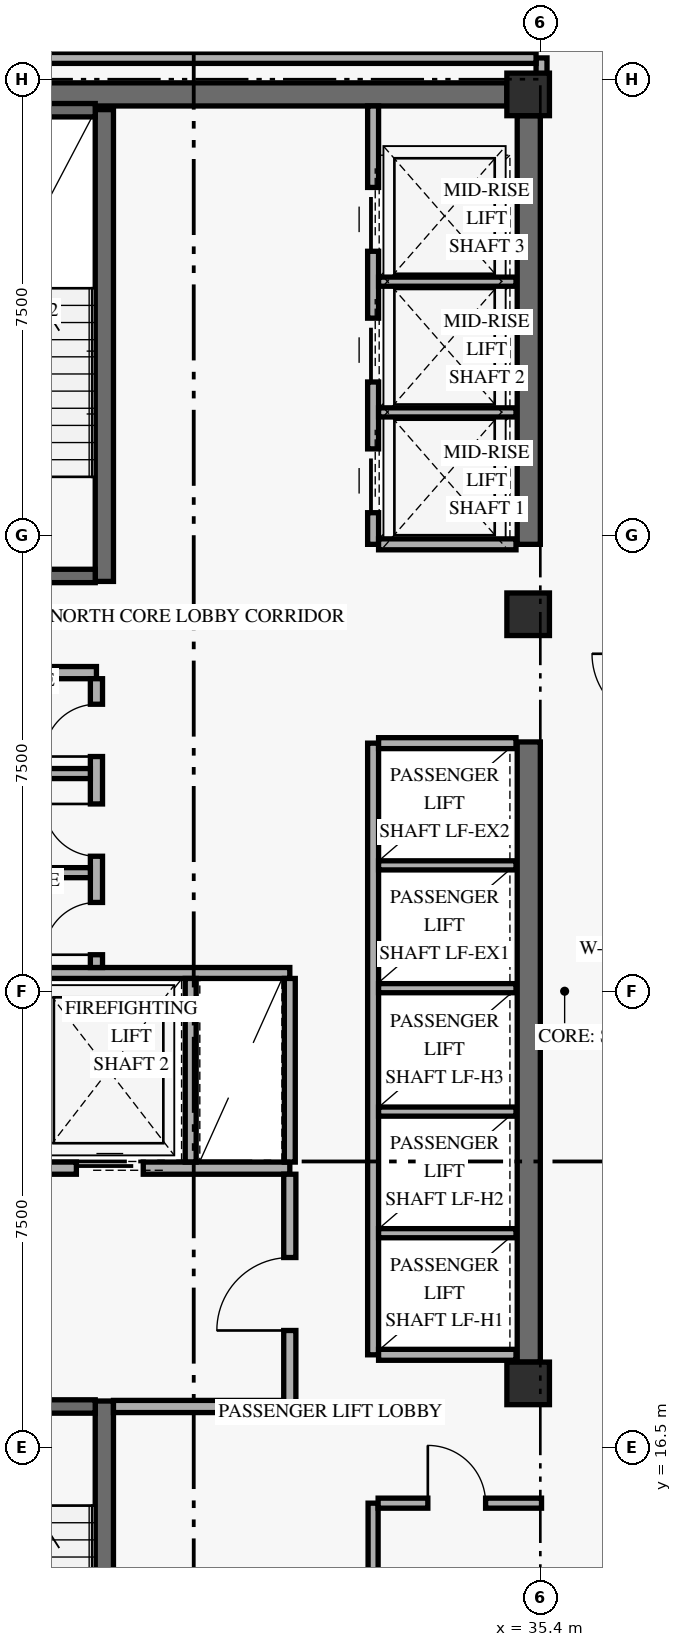
"""IFC4 building model, lengths in metres.
Left out: names, types, materials, properties, quantities, classifications, styles, units other than length and angle.
Written with IfcOpenShell. Run it as: python <this file> out.ifc"""

import sys

from ifc_helpers import new_model, si_unit, direction, frame, frame_2d, origin, origin_2d, place, context, subcontext, project, spatial, rectangle, extrude, element, fill, save


model = new_model("IFC4")
c1 = context("Model", 3, precision=1e-05, world=origin(), true_north=direction((0.0, 1.0)))
c2 = subcontext(c1, "Body", "Model", "MODEL_VIEW")
j1 = project(units=[si_unit("LENGTHUNIT", "METRE"), si_unit("PLANEANGLEUNIT", "RADIAN")], contexts=[c1])
p1 = place(None, origin())
s1 = spatial("IfcSite", under=j1, at=p1, CompositionType="ELEMENT")
p2 = place(p1, origin())
s2 = spatial("IfcBuilding", under=s1, at=p2, CompositionType="ELEMENT")
p3 = place(p2, frame((0.0, 0.0, 173.4)))
s3 = spatial("IfcBuildingStorey", under=s2, at=p3, CompositionType="ELEMENT", Elevation=173.4)
p4 = place(p3, frame((35.21, 17.9, 0.0), z_axis=(0.0, 0.0, 1.0), x_axis=(0.0, 1.0, 0.0)))
e1 = element("IfcWall", 1, at=p4, inside=s3, PredefinedType="SHEAR", context=c2, shape_type="SweptSolid", body=[
    extrude(rectangle(XDim=10.2, YDim=0.38, at=frame_2d((5.1, 0.0))), origin(), (0.0, 0.0, 1.0), 3.348),
])
p5 = place(p3, frame((35.21, 31.35, 0.0), z_axis=(0.0, 0.0, 1.0), x_axis=(0.0, 1.0, 0.0)))
e2 = element("IfcWall", 2, at=p5, inside=s3, PredefinedType="SHEAR", context=c2, shape_type="SweptSolid", body=[
    extrude(rectangle(XDim=7.05, YDim=0.38, at=frame_2d((3.525, 0.0))), origin(), (0.0, 0.0, 1.0), 3.348),
])
p6 = place(p3, frame((24.55, 38.75, 0.0), z_axis=(0.0, 0.0, 1.0), x_axis=(1.0, 0.0, 0.0)))
e3 = element("IfcWall", 3, at=p6, inside=s3, PredefinedType="SHEAR", context=c2, shape_type="SweptSolid", body=[
    extrude(rectangle(XDim=10.3, YDim=0.38, at=frame_2d((5.15, 0.0))), origin(), (0.0, 0.0, 1.0), 3.96),
])
p7 = place(p3, frame((28.23, 9.5, 0.0), z_axis=(0.0, 0.0, 1.0), x_axis=(0.0, 1.0, 0.0)))
e4 = element("IfcWall", 4, at=p7, inside=s3, PredefinedType="SHEAR", context=c2, shape_type="SweptSolid", body=[
    extrude(rectangle(XDim=7.76, YDim=0.3, at=frame_2d((3.88, 0.0))), origin(), (0.0, 0.0, 1.0), 3.96),
])
p8 = place(p3, frame((24.92, 17.17, 0.0), z_axis=(0.0, 0.0, 1.0), x_axis=(1.0, 0.0, 0.0)))
e5 = element("IfcWall", 5, at=p8, inside=s3, PredefinedType="SHEAR", context=c2, shape_type="SweptSolid", body=[
    extrude(rectangle(XDim=3.16, YDim=0.22, at=frame_2d((1.58, 0.0))), origin(), (0.0, 0.0, 1.0), 3.96),
])
p9 = place(p8, frame((0.78, 0.0, 0.0)))
e6 = element("IfcOpeningElement", 6, at=p9, cuts=e5, PredefinedType="OPENING", context=c2, shape_type="SweptSolid", body=[
    extrude(rectangle(XDim=1.05, YDim=2.15, at=frame_2d((0.525, 1.075))), frame((0.0, 0.12, 0.0), z_axis=(0.0, -1.0, 0.0), x_axis=(1.0, 0.0, 0.0)), (0.0, 0.0, 1.0), 0.24),
])
p10 = place(p3, frame((28.23, 30.74, 0.0), z_axis=(0.0, 0.0, 1.0), x_axis=(0.0, 1.0, 0.0)))
e7 = element("IfcWall", 7, at=p10, inside=s3, PredefinedType="SHEAR", context=c2, shape_type="SweptSolid", body=[
    extrude(rectangle(XDim=7.76, YDim=0.3, at=frame_2d((3.88, 0.0))), origin(), (0.0, 0.0, 1.0), 3.96),
])
p11 = place(p3, frame((24.92, 30.83, 0.0), z_axis=(0.0, 0.0, 1.0), x_axis=(1.0, 0.0, 0.0)))
e8 = element("IfcWall", 8, at=p11, inside=s3, PredefinedType="SHEAR", context=c2, shape_type="SweptSolid", body=[
    extrude(rectangle(XDim=3.16, YDim=0.22, at=frame_2d((1.58, 0.0))), origin(), (0.0, 0.0, 1.0), 3.96),
])
p12 = place(p11, frame((0.78, 0.0, 0.0)))
e9 = element("IfcOpeningElement", 9, at=p12, cuts=e8, PredefinedType="OPENING", context=c2, shape_type="SweptSolid", body=[
    extrude(rectangle(XDim=1.05, YDim=2.15, at=frame_2d((0.525, 1.075))), frame((0.0, 0.12, 0.0), z_axis=(0.0, -1.0, 0.0), x_axis=(1.0, 0.0, 0.0)), (0.0, 0.0, 1.0), 0.24),
])
p13 = place(p3, frame((24.92, 38.49, 0.0), z_axis=(0.0, 0.0, 1.0), x_axis=(1.0, 0.0, 0.0)))
e10 = element("IfcWall", 10, at=p13, inside=s3, PredefinedType="SHEAR", context=c2, shape_type="SweptSolid", body=[
    extrude(rectangle(XDim=3.16, YDim=0.22, at=frame_2d((1.58, 0.0))), origin(), (0.0, 0.0, 1.0), 3.96),
])
for number, where, z_axis, x_axis in (
    (11, (35.2, 17.55, 0.0), (0.0, 0.0, 1.0), (1.0, 0.0, 0.0)),
    (12, (35.2, 30.2, 0.0), (0.0, 0.0, 1.0), (1.0, 0.0, 0.0)),
    (13, (35.2, 38.75, 0.0), (0.0, 0.0, 1.0), (1.0, 0.0, 0.0)),
):
    element("IfcColumn", number, at=place(p3, frame(where, z_axis=z_axis, x_axis=x_axis)), inside=s3, PredefinedType="COLUMN", context=c2, shape_type="SweptSolid", body=[
        extrude(rectangle(XDim=0.7, YDim=0.7, at=origin_2d()), origin(), (0.0, 0.0, 1.0), 4.2),
    ])
p14 = place(p3, frame((24.45, 21.09, 0.0), z_axis=(0.0, 0.0, 1.0), x_axis=(1.0, 0.0, 0.0)))
e14 = element("IfcWall", 14, at=p14, inside=s3, PredefinedType="STANDARD", context=c2, shape_type="SweptSolid", body=[
    extrude(rectangle(XDim=6.83, YDim=0.2, at=frame_2d((3.415, 0.0))), origin(), (0.0, 0.0, 1.0), 3.96),
])
p15 = place(p14, frame((0.72, 0.0, 0.0)))
e15 = element("IfcOpeningElement", 15, at=p15, cuts=e14, PredefinedType="OPENING", context=c2, shape_type="SweptSolid", body=[
    extrude(rectangle(XDim=1.1, YDim=2.2, at=frame_2d((0.55, 1.1))), frame((0.0, 0.11, 0.0), z_axis=(0.0, -1.0, 0.0), x_axis=(1.0, 0.0, 0.0)), (0.0, 0.0, 1.0), 0.22),
])
p16 = place(p14, frame((3.32, 0.0, 0.0)))
e16 = element("IfcOpeningElement", 16, at=p16, cuts=e14, PredefinedType="OPENING", context=c2, shape_type="SweptSolid", body=[
    extrude(rectangle(XDim=1.1, YDim=2.2, at=frame_2d((0.55, 1.1))), frame((0.0, 0.11, 0.0), z_axis=(0.0, -1.0, 0.0), x_axis=(1.0, 0.0, 0.0)), (0.0, 0.0, 1.0), 0.22),
])
p17 = place(p3, frame((28.38, 17.17, 0.0), z_axis=(0.0, 0.0, 1.0), x_axis=(1.0, 0.0, 0.0)))
e17 = element("IfcWall", 17, at=p17, inside=s3, PredefinedType="STANDARD", context=c2, shape_type="SweptSolid", body=[
    extrude(rectangle(XDim=2.9, YDim=0.2, at=frame_2d((1.45, 0.0))), origin(), (0.0, 0.0, 1.0), 3.96),
])
p18 = place(p3, frame((31.28, 17.07, 0.0), z_axis=(0.0, 0.0, 1.0), x_axis=(0.0, 1.0, 0.0)))
e18 = element("IfcWall", 18, at=p18, inside=s3, PredefinedType="STANDARD", context=c2, shape_type="SweptSolid", body=[
    extrude(rectangle(XDim=3.92, YDim=0.2, at=frame_2d((1.96, 0.0))), origin(), (0.0, 0.0, 1.0), 3.33),
])
p19 = place(p18, frame((1.35, 0.0, 0.0)))
e19 = element("IfcOpeningElement", 19, at=p19, cuts=e18, PredefinedType="OPENING", context=c2, shape_type="SweptSolid", body=[
    extrude(rectangle(XDim=1.2, YDim=2.15, at=frame_2d((0.6, 1.075))), frame((0.0, 0.11, 0.0), z_axis=(0.0, -1.0, 0.0), x_axis=(1.0, 0.0, 0.0)), (0.0, 0.0, 1.0), 0.22),
])
p20 = place(p3, frame((24.45, 24.3, 0.0), z_axis=(0.0, 0.0, 1.0), x_axis=(1.0, 0.0, 0.0)))
e20 = element("IfcWall", 20, at=p20, inside=s3, PredefinedType="STANDARD", context=c2, shape_type="SweptSolid", body=[
    extrude(rectangle(XDim=6.83, YDim=0.18, at=frame_2d((3.415, 0.0))), origin(), (0.0, 0.0, 1.0), 3.96),
])
for number, where, z_axis, x_axis in (
    (21, (29.65, 21.19, 0.0), (0.0, 0.0, 1.0), (0.0, 1.0, 0.0)),
    (22, (31.28, 21.19, 0.0), (0.0, 0.0, 1.0), (0.0, 1.0, 0.0)),
):
    element("IfcWall", number, at=place(p3, frame(where, z_axis=z_axis, x_axis=x_axis)), inside=s3, PredefinedType="STANDARD", context=c2, shape_type="SweptSolid", body=[
        extrude(rectangle(XDim=3.02, YDim=0.18, at=frame_2d((1.51, 0.0))), origin(), (0.0, 0.0, 1.0), 3.96),
    ])
p21 = place(p3, frame((24.45, 29.24, 0.0), z_axis=(0.0, 0.0, 1.0), x_axis=(1.0, 0.0, 0.0)))
e23 = element("IfcWall", 23, at=p21, inside=s3, PredefinedType="STANDARD", context=c2, shape_type="SweptSolid", body=[
    extrude(rectangle(XDim=3.65, YDim=0.2, at=frame_2d((1.825, 0.0))), origin(), (0.0, 0.0, 1.0), 3.96),
])
p22 = place(p3, frame((28.1, 24.39, 0.0), z_axis=(0.0, 0.0, 1.0), x_axis=(0.0, 1.0, 0.0)))
e24 = element("IfcWall", 24, at=p22, inside=s3, PredefinedType="STANDARD", context=c2, shape_type="SweptSolid", body=[
    extrude(rectangle(XDim=4.75, YDim=0.2, at=frame_2d((2.375, 0.0))), origin(), (0.0, 0.0, 1.0), 3.96),
])
p23 = place(p22, frame((0.21, 0.0, 0.0)))
e25 = element("IfcOpeningElement", 25, at=p23, cuts=e24, PredefinedType="OPENING", context=c2, shape_type="SweptSolid", body=[
    extrude(rectangle(XDim=0.86, YDim=2.1, at=frame_2d((0.43, 1.05))), frame((0.0, 0.11, 0.0), z_axis=(0.0, -1.0, 0.0), x_axis=(1.0, 0.0, 0.0)), (0.0, 0.0, 1.0), 0.22),
])
p24 = place(p22, frame((1.83, 0.0, 0.0)))
e26 = element("IfcOpeningElement", 26, at=p24, cuts=e24, PredefinedType="OPENING", context=c2, shape_type="SweptSolid", body=[
    extrude(rectangle(XDim=0.86, YDim=2.1, at=frame_2d((0.43, 1.05))), frame((0.0, 0.11, 0.0), z_axis=(0.0, -1.0, 0.0), x_axis=(1.0, 0.0, 0.0)), (0.0, 0.0, 1.0), 0.22),
])
p25 = place(p22, frame((3.47, 0.0, 0.0)))
e27 = element("IfcOpeningElement", 27, at=p25, cuts=e24, PredefinedType="OPENING", context=c2, shape_type="SweptSolid", body=[
    extrude(rectangle(XDim=0.86, YDim=2.1, at=frame_2d((0.43, 1.05))), frame((0.0, 0.11, 0.0), z_axis=(0.0, -1.0, 0.0), x_axis=(1.0, 0.0, 0.0)), (0.0, 0.0, 1.0), 0.22),
])
for number, where, z_axis, x_axis in (
    (28, (24.45, 25.95, 0.0), (0.0, 0.0, 1.0), (1.0, 0.0, 0.0)),
    (29, (24.45, 27.58, 0.0), (0.0, 0.0, 1.0), (1.0, 0.0, 0.0)),
):
    element("IfcWall", number, at=place(p3, frame(where, z_axis=z_axis, x_axis=x_axis)), inside=s3, PredefinedType="PARTITIONING", context=c2, shape_type="SweptSolid", body=[
        extrude(rectangle(XDim=3.55, YDim=0.165, at=frame_2d((1.775, 0.0))), origin(), (0.0, 0.0, 1.0), 3.96),
    ])
p26 = place(p3, frame((32.65, 18.02, 0.0), z_axis=(0.0, 0.0, 1.0), x_axis=(0.0, 1.0, 0.0)))
e30 = element("IfcWall", 30, at=p26, inside=s3, PredefinedType="STANDARD", context=c2, shape_type="SweptSolid", body=[
    extrude(rectangle(XDim=10.06, YDim=0.18, at=frame_2d((5.03, 0.0))), origin(), (0.0, 0.0, 1.0), 3.96),
])
for number, where, z_axis, x_axis in (
    (31, (32.74, 18.02, 0.0), (0.0, 0.0, 1.0), (1.0, 0.0, 0.0)),
    (32, (32.74, 28.08, 0.0), (0.0, 0.0, 1.0), (1.0, 0.0, 0.0)),
):
    element("IfcWall", number, at=place(p3, frame(where, z_axis=z_axis, x_axis=x_axis)), inside=s3, PredefinedType="STANDARD", context=c2, shape_type="SweptSolid", body=[
        extrude(rectangle(XDim=2.26, YDim=0.18, at=frame_2d((1.13, 0.0))), origin(), (0.0, 0.0, 1.0), 3.96),
    ])
for number, where, z_axis, x_axis in (
    (33, (32.74, 20.02, 0.0), (0.0, 0.0, 1.0), (1.0, 0.0, 0.0)),
    (34, (32.74, 22.02, 0.0), (0.0, 0.0, 1.0), (1.0, 0.0, 0.0)),
    (35, (32.74, 24.05, 0.0), (0.0, 0.0, 1.0), (1.0, 0.0, 0.0)),
    (36, (32.74, 26.07, 0.0), (0.0, 0.0, 1.0), (1.0, 0.0, 0.0)),
):
    element("IfcWall", number, at=place(p3, frame(where, z_axis=z_axis, x_axis=x_axis)), inside=s3, PredefinedType="STANDARD", context=c2, shape_type="SweptSolid", body=[
        extrude(rectangle(XDim=2.26, YDim=0.15, at=frame_2d((1.13, 0.0))), origin(), (0.0, 0.0, 1.0), 3.96),
    ])
p27 = place(p3, frame((32.65, 31.35, 0.0), z_axis=(0.0, 0.0, 1.0), x_axis=(0.0, 1.0, 0.0)))
e37 = element("IfcWall", 37, at=p27, inside=s3, PredefinedType="STANDARD", context=c2, shape_type="SweptSolid", body=[
    extrude(rectangle(XDim=7.21, YDim=0.18, at=frame_2d((3.605, 0.0))), origin(), (0.0, 0.0, 1.0), 3.96),
])
p28 = place(p27, frame((0.52, 0.0, 0.0)))
e38 = element("IfcOpeningElement", 38, at=p28, cuts=e37, PredefinedType="OPENING", context=c2, shape_type="SweptSolid", body=[
    extrude(rectangle(XDim=1.05, YDim=2.2, at=frame_2d((0.525, 1.1))), frame((0.0, 0.1, 0.0), z_axis=(0.0, -1.0, 0.0), x_axis=(1.0, 0.0, 0.0)), (0.0, 0.0, 1.0), 0.2),
])
p29 = place(p27, frame((2.67, 0.0, 0.0)))
e39 = element("IfcOpeningElement", 39, at=p29, cuts=e37, PredefinedType="OPENING", context=c2, shape_type="SweptSolid", body=[
    extrude(rectangle(XDim=1.05, YDim=2.2, at=frame_2d((0.525, 1.1))), frame((0.0, 0.1, 0.0), z_axis=(0.0, -1.0, 0.0), x_axis=(1.0, 0.0, 0.0)), (0.0, 0.0, 1.0), 0.2),
])
p30 = place(p27, frame((4.82, 0.0, 0.0)))
e40 = element("IfcOpeningElement", 40, at=p30, cuts=e37, PredefinedType="OPENING", context=c2, shape_type="SweptSolid", body=[
    extrude(rectangle(XDim=1.05, YDim=2.2, at=frame_2d((0.525, 1.1))), frame((0.0, 0.1, 0.0), z_axis=(0.0, -1.0, 0.0), x_axis=(1.0, 0.0, 0.0)), (0.0, 0.0, 1.0), 0.2),
])
p31 = place(p3, frame((32.74, 31.35, 0.0), z_axis=(0.0, 0.0, 1.0), x_axis=(1.0, 0.0, 0.0)))
e41 = element("IfcWall", 41, at=p31, inside=s3, PredefinedType="STANDARD", context=c2, shape_type="SweptSolid", body=[
    extrude(rectangle(XDim=2.26, YDim=0.18, at=frame_2d((1.13, 0.0))), origin(), (0.0, 0.0, 1.0), 3.96),
])
for number, where, z_axis, x_axis in (
    (42, (32.74, 33.52, 0.0), (0.0, 0.0, 1.0), (1.0, 0.0, 0.0)),
    (43, (32.74, 35.67, 0.0), (0.0, 0.0, 1.0), (1.0, 0.0, 0.0)),
):
    element("IfcWall", number, at=place(p3, frame(where, z_axis=z_axis, x_axis=x_axis)), inside=s3, PredefinedType="STANDARD", context=c2, shape_type="SweptSolid", body=[
        extrude(rectangle(XDim=2.26, YDim=0.15, at=frame_2d((1.13, 0.0))), origin(), (0.0, 0.0, 1.0), 3.96),
    ])
p32 = place(p3, frame((35.42, 38.75, 0.0), z_axis=(0.0, 0.0, 1.0), x_axis=(0.0, 1.0, 0.0)))
e44 = element("IfcWall", 44, at=p32, inside=s3, PredefinedType="STANDARD", context=c2, shape_type="SweptSolid", body=[
    extrude(rectangle(XDim=0.6, YDim=0.18, at=frame_2d((0.3, 0.0))), origin(), (0.0, 0.0, 1.0), 3.33),
])
p33 = place(p3, frame((32.65, 9.5, 0.0), z_axis=(0.0, 0.0, 1.0), x_axis=(0.0, 1.0, 0.0)))
e45 = element("IfcWall", 45, at=p33, inside=s3, PredefinedType="PARTITIONING", context=c2, shape_type="SweptSolid", body=[
    extrude(rectangle(XDim=6.08, YDim=0.165, at=frame_2d((3.04, 0.0))), origin(), (0.0, 0.0, 1.0), 3.96),
])
p34 = place(p3, frame((32.732, 15.58, 0.0), z_axis=(0.0, 0.0, 1.0), x_axis=(1.0, 0.0, 0.0)))
e46 = element("IfcWall", 46, at=p34, inside=s3, PredefinedType="PARTITIONING", context=c2, shape_type="SweptSolid", body=[
    extrude(rectangle(XDim=2.688, YDim=0.165, at=frame_2d((1.344, 0.0))), origin(), (0.0, 0.0, 1.0), 3.33),
])
p35 = place(p34, frame((0.817, 0.0, 0.0)))
e47 = element("IfcOpeningElement", 47, at=p35, cuts=e46, PredefinedType="OPENING", context=c2, shape_type="SweptSolid", body=[
    extrude(rectangle(XDim=0.95, YDim=2.15, at=frame_2d((0.475, 1.075))), frame((0.0, 0.093, 0.0), z_axis=(0.0, -1.0, 0.0), x_axis=(1.0, 0.0, 0.0)), (0.0, 0.0, 1.0), 0.185),
])
p36 = place(p3, frame((23.85, 39.35, 0.0), z_axis=(0.0, 0.0, 1.0), x_axis=(1.0, 0.0, 0.0)))
e48 = element("IfcWall", 48, at=p36, inside=s3, PredefinedType="STANDARD", context=c2, shape_type="SweptSolid", body=[
    extrude(rectangle(XDim=11.48, YDim=0.18, at=frame_2d((5.74, 0.0))), origin(), (0.0, 0.0, 1.0), 3.33),
])
p37 = place(p16, origin())
e49 = element("IfcDoor", 49, at=p37, inside=s3, OperationType="SLIDING_TO_LEFT", PredefinedType="DOOR", context=c2, shape_type="SweptSolid", body=[
    extrude(rectangle(XDim=1.1, YDim=2.2, at=frame_2d((0.55, 1.1))), frame((0.0, 0.025, 0.0), z_axis=(0.0, -1.0, 0.0), x_axis=(1.0, 0.0, 0.0)), (0.0, 0.0, 1.0), 0.05),
])
fill(e16, e49)
p38 = place(p19, origin())
e50 = element("IfcDoor", 50, at=p38, inside=s3, OperationType="SINGLE_SWING_LEFT", PredefinedType="DOOR", context=c2, shape_type="SweptSolid", body=[
    extrude(rectangle(XDim=1.2, YDim=2.15, at=frame_2d((0.6, 1.075))), frame((0.0, 0.025, 0.0), z_axis=(0.0, -1.0, 0.0), x_axis=(1.0, 0.0, 0.0)), (0.0, 0.0, 1.0), 0.05),
])
fill(e19, e50)
p39 = place(p23, origin())
e51 = element("IfcDoor", 51, at=p39, inside=s3, OperationType="SINGLE_SWING_LEFT", PredefinedType="DOOR", context=c2, shape_type="SweptSolid", body=[
    extrude(rectangle(XDim=0.86, YDim=2.1, at=frame_2d((0.43, 1.05))), frame((0.0, 0.025, 0.0), z_axis=(0.0, -1.0, 0.0), x_axis=(1.0, 0.0, 0.0)), (0.0, 0.0, 1.0), 0.05),
])
fill(e25, e51)
p40 = place(p24, origin())
e52 = element("IfcDoor", 52, at=p40, inside=s3, OperationType="SINGLE_SWING_RIGHT", PredefinedType="DOOR", context=c2, shape_type="SweptSolid", body=[
    extrude(rectangle(XDim=0.86, YDim=2.1, at=frame_2d((0.43, 1.05))), frame((0.0, 0.025, 0.0), z_axis=(0.0, -1.0, 0.0), x_axis=(1.0, 0.0, 0.0)), (0.0, 0.0, 1.0), 0.05),
])
fill(e26, e52)
p41 = place(p25, origin())
e53 = element("IfcDoor", 53, at=p41, inside=s3, OperationType="SINGLE_SWING_LEFT", PredefinedType="DOOR", context=c2, shape_type="SweptSolid", body=[
    extrude(rectangle(XDim=0.86, YDim=2.1, at=frame_2d((0.43, 1.05))), frame((0.0, 0.025, 0.0), z_axis=(0.0, -1.0, 0.0), x_axis=(1.0, 0.0, 0.0)), (0.0, 0.0, 1.0), 0.05),
])
fill(e27, e53)
p42 = place(p28, origin())
e54 = element("IfcDoor", 54, at=p42, inside=s3, OperationType="SLIDING_TO_LEFT", PredefinedType="DOOR", context=c2, shape_type="SweptSolid", body=[
    extrude(rectangle(XDim=1.05, YDim=2.2, at=frame_2d((0.525, 1.1))), frame((0.0, 0.025, 0.0), z_axis=(0.0, -1.0, 0.0), x_axis=(1.0, 0.0, 0.0)), (0.0, 0.0, 1.0), 0.05),
])
fill(e38, e54)
p43 = place(p29, origin())
e55 = element("IfcDoor", 55, at=p43, inside=s3, OperationType="SLIDING_TO_LEFT", PredefinedType="DOOR", context=c2, shape_type="SweptSolid", body=[
    extrude(rectangle(XDim=1.05, YDim=2.2, at=frame_2d((0.525, 1.1))), frame((0.0, 0.025, 0.0), z_axis=(0.0, -1.0, 0.0), x_axis=(1.0, 0.0, 0.0)), (0.0, 0.0, 1.0), 0.05),
])
fill(e39, e55)
p44 = place(p30, origin())
e56 = element("IfcDoor", 56, at=p44, inside=s3, OperationType="SLIDING_TO_LEFT", PredefinedType="DOOR", context=c2, shape_type="SweptSolid", body=[
    extrude(rectangle(XDim=1.05, YDim=2.2, at=frame_2d((0.525, 1.1))), frame((0.0, 0.025, 0.0), z_axis=(0.0, -1.0, 0.0), x_axis=(1.0, 0.0, 0.0)), (0.0, 0.0, 1.0), 0.05),
])
fill(e40, e56)
p45 = place(p35, origin())
e57 = element("IfcDoor", 57, at=p45, inside=s3, OperationType="SINGLE_SWING_LEFT", PredefinedType="DOOR", context=c2, shape_type="SweptSolid", body=[
    extrude(rectangle(XDim=0.95, YDim=2.15, at=frame_2d((0.475, 1.075))), frame((0.0, 0.025, 0.0), z_axis=(0.0, -1.0, 0.0), x_axis=(1.0, 0.0, 0.0)), (0.0, 0.0, 1.0), 0.05),
])
fill(e47, e57)
save(model, sys.argv[1])
